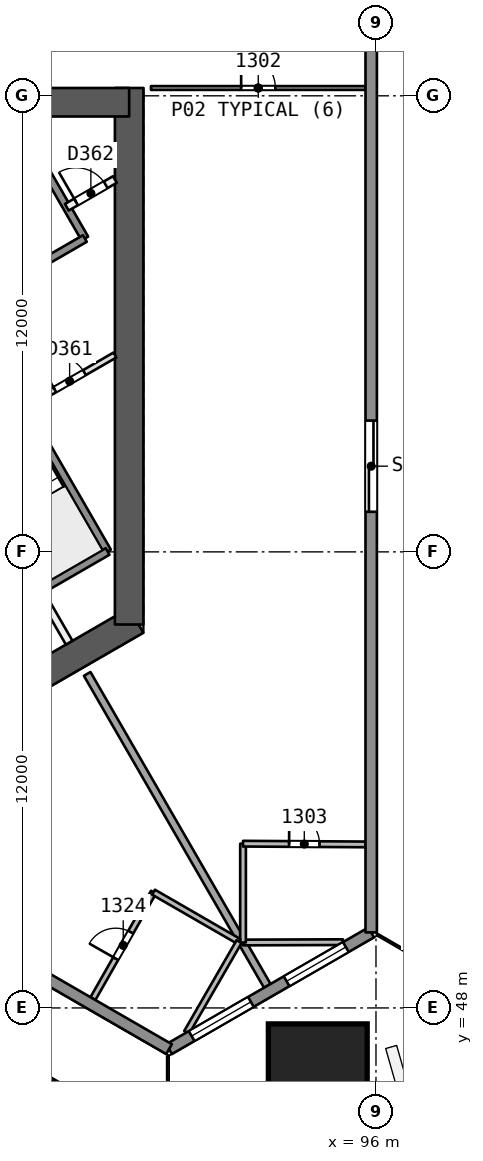
"""IFC4 building model, lengths in metres.
Left out: names, types, materials, properties, quantities, classifications, styles, units other than length and angle.
Written with IfcOpenShell. Run it as: python <this file> out.ifc"""

import sys

from ifc_helpers import new_model, si_unit, direction, frame, frame_2d, origin, origin_2d, place, context, subcontext, project, spatial, rectangle, extrude, element, fill, save


model = new_model("IFC4")
c1 = context("Model", 3, precision=1e-05, world=origin(), true_north=direction((0.0, 1.0)))
c2 = subcontext(c1, "Body", "Model", "MODEL_VIEW")
j1 = project(units=[si_unit("LENGTHUNIT", "METRE"), si_unit("PLANEANGLEUNIT", "RADIAN")], contexts=[c1])
p1 = place(None, origin())
s1 = spatial("IfcSite", under=j1, at=p1, CompositionType="ELEMENT")
p2 = place(p1, origin())
s2 = spatial("IfcBuilding", under=s1, at=p2, CompositionType="ELEMENT")
p3 = place(p2, frame((0.0, 0.0, 61.0)))
s3 = spatial("IfcBuildingStorey", under=s2, at=p3, CompositionType="ELEMENT", Elevation=61.0)
p4 = place(p3, frame((86.723, 56.483, 0.0), z_axis=(0.0, 0.0, 1.0), x_axis=(0.866017201164, 0.500014207086, 0.0)))
e1 = element("IfcWall", 1, at=p4, inside=s3, PredefinedType="SHEAR", context=c2, shape_type="SweptSolid", body=[
    extrude(rectangle(XDim=3.429, YDim=0.75, at=frame_2d((1.714, 0.0))), origin(), (0.0, 0.0, 1.0), 3.7),
])
p5 = place(p3, frame((89.505, 58.089, 0.0), z_axis=(0.0, 0.0, 1.0), x_axis=(0.0, 1.0, 0.0)))
e2 = element("IfcWall", 2, at=p5, inside=s3, PredefinedType="SHEAR", context=c2, shape_type="SweptSolid", body=[
    extrude(rectangle(XDim=14.117, YDim=0.75, at=frame_2d((7.059, 0.0))), origin(), (0.0, 0.0, 1.0), 3.7),
])
p6 = place(p3, frame((89.505, 71.831, 0.0), z_axis=(0.0, 0.0, 1.0), x_axis=(-1.0, 0.0, 0.0)))
e3 = element("IfcWall", 3, at=p6, inside=s3, PredefinedType="SHEAR", context=c2, shape_type="SweptSolid", body=[
    extrude(rectangle(XDim=10.005, YDim=0.75, at=frame_2d((5.002, 0.0))), origin(), (0.0, 0.0, 1.0), 3.7),
])
p7 = place(p6, frame((7.855, 0.0, 0.0)))
e4 = element("IfcOpeningElement", 4, at=p7, cuts=e3, PredefinedType="OPENING", context=c2, shape_type="SweptSolid", body=[
    extrude(rectangle(XDim=1.2, YDim=2.1, at=frame_2d((0.6, 1.05))), frame((0.0, 0.385, 0.0), z_axis=(0.0, -1.0, 0.0), x_axis=(1.0, 0.0, 0.0)), (0.0, 0.0, 1.0), 0.771),
])
p8 = place(p3, frame((94.49, 46.243, 0.0), z_axis=(-0.017607037296, 0.030466109479, 0.999380712447), x_axis=(0.500061328599, -0.865274797998, 0.035187946645)))
e5 = element("IfcColumn", 5, at=p8, inside=s3, PredefinedType="COLUMN", context=c2, shape_type="SweptSolid", body=[
    extrude(rectangle(XDim=2.6, YDim=2.6, at=origin_2d()), origin(), (0.0, 0.0, 1.0), 3.702),
])
p9 = place(p3, frame((90.079, 72.206, 0.0), z_axis=(0.0, 0.0, 1.0), x_axis=(1.0, 0.0, 0.0)))
e6 = element("IfcWall", 6, at=p9, inside=s3, PredefinedType="PARTITIONING", context=c2, shape_type="SweptSolid", body=[
    extrude(rectangle(XDim=5.646, YDim=0.1, at=frame_2d((2.823, 0.0))), origin(), (0.0, 0.0, 1.0), 3.2),
])
p10 = place(p9, frame((2.373, 0.0, 0.0)))
e7 = element("IfcOpeningElement", 7, at=p10, cuts=e6, PredefinedType="OPENING", context=c2, shape_type="SweptSolid", body=[
    extrude(rectangle(XDim=0.9, YDim=2.1, at=frame_2d((0.45, 1.05))), frame((0.0, 0.061, 0.0), z_axis=(0.0, -1.0, 0.0), x_axis=(1.0, 0.0, 0.0)), (0.0, 0.0, 1.0), 0.121),
])
p11 = place(p3, frame((95.131, 49.73, 0.0), z_axis=(0.0, 0.0, 1.0), x_axis=(-0.999994721507, -0.00324914735, 0.0)))
e8 = element("IfcWall", 8, at=p11, inside=s3, PredefinedType="PARTITIONING", context=c2, shape_type="SweptSolid", body=[
    extrude(rectangle(XDim=2.63, YDim=0.15, at=frame_2d((1.315, 0.0))), origin(), (0.0, 0.0, 1.0), 3.2),
])
p12 = place(p3, frame((92.501, 49.722, 0.0), z_axis=(0.0, 0.0, 1.0), x_axis=(0.0, 1.0, 0.0)))
e9 = element("IfcWall", 9, at=p12, inside=s3, PredefinedType="PARTITIONING", context=c2, shape_type="SweptSolid", body=[
    extrude(rectangle(XDim=2.6, YDim=0.15, at=frame_2d((1.3, 0.0))), origin(), (0.0, 0.0, 1.0), 3.2),
])
p13 = place(p3, frame((92.501, 52.322, 0.0), z_axis=(0.0, 0.0, 1.0), x_axis=(0.999982552355, -0.005907197749, 0.0)))
e10 = element("IfcWall", 10, at=p13, inside=s3, PredefinedType="PARTITIONING", context=c2, shape_type="SweptSolid", body=[
    extrude(rectangle(XDim=3.224, YDim=0.15, at=frame_2d((1.612, 0.0))), origin(), (0.0, 0.0, 1.0), 3.2),
])
p14 = place(p13, frame((1.212, 0.0, 0.0)))
e11 = element("IfcOpeningElement", 11, at=p14, cuts=e10, PredefinedType="OPENING", context=c2, shape_type="SweptSolid", body=[
    extrude(rectangle(XDim=0.8, YDim=2.1, at=frame_2d((0.4, 1.05))), frame((0.0, 0.085, 0.0), z_axis=(0.0, -1.0, 0.0), x_axis=(1.0, 0.0, 0.0)), (0.0, 0.0, 1.0), 0.171),
])
p15 = place(p3, frame((88.401, 56.789, 0.0), z_axis=(0.0, 0.0, 1.0), x_axis=(0.499990030109, -0.866031159827, 0.0)))
e12 = element("IfcWall", 12, at=p15, inside=s3, PredefinedType="PARTITIONING", context=c2, shape_type="SweptSolid", body=[
    extrude(rectangle(XDim=9.478, YDim=0.2, at=frame_2d((4.739, 0.0))), origin(), (0.0, 0.0, 1.0), 3.2),
])
p16 = place(p3, frame((88.551, 48.245, 0.0), z_axis=(0.0, 0.0, 1.0), x_axis=(0.494849738902, 0.868978558947, 0.0)))
e13 = element("IfcWall", 13, at=p16, inside=s3, PredefinedType="PARTITIONING", context=c2, shape_type="SweptSolid", body=[
    extrude(rectangle(XDim=3.224, YDim=0.15, at=frame_2d((1.612, 0.0))), origin(), (0.0, 0.0, 1.0), 3.2),
])
p17 = place(p16, frame((1.212, 0.0, 0.0)))
e14 = element("IfcOpeningElement", 14, at=p17, cuts=e13, PredefinedType="OPENING", context=c2, shape_type="SweptSolid", body=[
    extrude(rectangle(XDim=0.8, YDim=2.1, at=frame_2d((0.4, 1.05))), frame((0.0, 0.085, 0.0), z_axis=(0.0, -1.0, 0.0), x_axis=(1.0, 0.0, 0.0)), (0.0, 0.0, 1.0), 0.171),
])
p18 = place(p3, frame((90.146, 51.046, 0.0), z_axis=(0.0, 0.0, 1.0), x_axis=(0.866021400173, -0.500006934395, 0.0)))
e15 = element("IfcWall", 15, at=p18, inside=s3, PredefinedType="PARTITIONING", context=c2, shape_type="SweptSolid", body=[
    extrude(rectangle(XDim=2.6, YDim=0.15, at=frame_2d((1.3, 0.0))), origin(), (0.0, 0.0, 1.0), 3.2),
])
p19 = place(p3, frame((92.398, 49.746, 0.0), z_axis=(0.0, 0.0, 1.0), x_axis=(-0.50001084716, -0.866019141083, 0.0)))
e16 = element("IfcWall", 16, at=p19, inside=s3, PredefinedType="PARTITIONING", context=c2, shape_type="SweptSolid", body=[
    extrude(rectangle(XDim=2.76, YDim=0.15, at=frame_2d((1.38, 0.0))), origin(), (0.0, 0.0, 1.0), 3.2),
])
p20 = place(p3, frame((95.874, 49.987, 0.0), z_axis=(0.0, 0.0, 1.0), x_axis=(-0.866013487713, -0.500020638674, 0.0)))
e17 = element("IfcWall", 17, at=p20, inside=s3, PredefinedType="SOLIDWALL", context=c2, shape_type="SweptSolid", body=[
    extrude(rectangle(XDim=6.142, YDim=0.3, at=frame_2d((3.071, 0.0))), origin(), (0.0, 0.0, 1.0), 3.2),
])
p21 = place(p20, frame((0.771, 0.0, 0.9)))
e18 = element("IfcOpeningElement", 18, at=p21, cuts=e17, PredefinedType="OPENING", context=c2, shape_type="SweptSolid", body=[
    extrude(rectangle(XDim=1.8, YDim=1.5, at=frame_2d((0.9, 0.75))), frame((0.0, 0.161, 0.0), z_axis=(0.0, -1.0, 0.0), x_axis=(1.0, 0.0, 0.0)), (0.0, 0.0, 1.0), 0.321),
])
p22 = place(p20, frame((3.656, 0.0, 0.9)))
e19 = element("IfcOpeningElement", 19, at=p22, cuts=e17, PredefinedType="OPENING", context=c2, shape_type="SweptSolid", body=[
    extrude(rectangle(XDim=1.8, YDim=1.5, at=frame_2d((0.9, 0.75))), frame((0.0, 0.161, 0.0), z_axis=(0.0, -1.0, 0.0), x_axis=(1.0, 0.0, 0.0)), (0.0, 0.0, 1.0), 0.321),
])
p23 = place(p3, frame((95.874, 110.013, 0.0), z_axis=(0.0, 0.0, 1.0), x_axis=(0.0, -1.0, 0.0)))
e20 = element("IfcWall", 20, at=p23, inside=s3, PredefinedType="SOLIDWALL", context=c2, shape_type="SweptSolid", body=[
    extrude(rectangle(XDim=60.025, YDim=0.3, at=frame_2d((30.013, 0.0))), origin(), (0.0, 0.0, 1.0), 3.2),
])
p24 = place(p23, frame((28.501, 0.0, 0.0)))
e21 = element("IfcOpeningElement", 21, at=p24, cuts=e20, PredefinedType="OPENING", context=c2, shape_type="SweptSolid", body=[
    extrude(rectangle(XDim=2.4, YDim=2.4, at=frame_2d((1.2, 1.2))), frame((0.0, 0.161, 0.0), z_axis=(0.0, -1.0, 0.0), x_axis=(1.0, 0.0, 0.0)), (0.0, 0.0, 1.0), 0.321),
])
p25 = place(p23, frame((34.269, 0.0, 0.0)))
e22 = element("IfcOpeningElement", 22, at=p25, cuts=e20, PredefinedType="OPENING", context=c2, shape_type="SweptSolid", body=[
    extrude(rectangle(XDim=2.4, YDim=2.4, at=frame_2d((1.2, 1.2))), frame((0.0, 0.161, 0.0), z_axis=(0.0, -1.0, 0.0), x_axis=(1.0, 0.0, 0.0)), (0.0, 0.0, 1.0), 0.321),
])
p26 = place(p23, frame((46.558, 0.0, 0.0)))
e23 = element("IfcOpeningElement", 23, at=p26, cuts=e20, PredefinedType="OPENING", context=c2, shape_type="SweptSolid", body=[
    extrude(rectangle(XDim=2.4, YDim=2.4, at=frame_2d((1.2, 1.2))), frame((0.0, 0.161, 0.0), z_axis=(0.0, -1.0, 0.0), x_axis=(1.0, 0.0, 0.0)), (0.0, 0.0, 1.0), 0.321),
])
p27 = place(p23, frame((23.045, 0.0, 0.0)))
e24 = element("IfcOpeningElement", 24, at=p27, cuts=e20, PredefinedType="OPENING", context=c2, shape_type="SweptSolid", body=[
    extrude(rectangle(XDim=2.4, YDim=2.4, at=frame_2d((1.2, 1.2))), frame((0.0, 0.161, 0.0), z_axis=(0.0, -1.0, 0.0), x_axis=(1.0, 0.0, 0.0)), (0.0, 0.0, 1.0), 0.321),
])
p28 = place(p23, frame((11.109, 0.0, 0.0)))
e25 = element("IfcOpeningElement", 25, at=p28, cuts=e20, PredefinedType="OPENING", context=c2, shape_type="SweptSolid", body=[
    extrude(rectangle(XDim=2.4, YDim=2.4, at=frame_2d((1.2, 1.2))), frame((0.0, 0.161, 0.0), z_axis=(0.0, -1.0, 0.0), x_axis=(1.0, 0.0, 0.0)), (0.0, 0.0, 1.0), 0.321),
])
p29 = place(p3, frame((90.555, 46.916, 0.0), z_axis=(0.0, 0.0, 1.0), x_axis=(-0.866024926003, 0.500000827541, 0.0)))
e26 = element("IfcWall", 26, at=p29, inside=s3, PredefinedType="SOLIDWALL", context=c2, shape_type="SweptSolid", body=[
    extrude(rectangle(XDim=60.025, YDim=0.3, at=frame_2d((30.013, 0.0))), origin(), (0.0, 0.0, 1.0), 3.2),
])
p30 = place(p29, frame((28.813, 0.0, 0.0)))
e27 = element("IfcOpeningElement", 27, at=p30, cuts=e26, PredefinedType="OPENING", context=c2, shape_type="SweptSolid", body=[
    extrude(rectangle(XDim=2.4, YDim=2.4, at=frame_2d((1.2, 1.2))), frame((0.0, 0.161, 0.0), z_axis=(0.0, -1.0, 0.0), x_axis=(1.0, 0.0, 0.0)), (0.0, 0.0, 1.0), 0.321),
])
p31 = place(p29, frame((34.269, 0.0, 0.0)))
e28 = element("IfcOpeningElement", 28, at=p31, cuts=e26, PredefinedType="OPENING", context=c2, shape_type="SweptSolid", body=[
    extrude(rectangle(XDim=2.4, YDim=2.4, at=frame_2d((1.2, 1.2))), frame((0.0, 0.161, 0.0), z_axis=(0.0, -1.0, 0.0), x_axis=(1.0, 0.0, 0.0)), (0.0, 0.0, 1.0), 0.321),
])
p32 = place(p29, frame((46.558, 0.0, 0.0)))
e29 = element("IfcOpeningElement", 29, at=p32, cuts=e26, PredefinedType="OPENING", context=c2, shape_type="SweptSolid", body=[
    extrude(rectangle(XDim=2.4, YDim=2.4, at=frame_2d((1.2, 1.2))), frame((0.0, 0.161, 0.0), z_axis=(0.0, -1.0, 0.0), x_axis=(1.0, 0.0, 0.0)), (0.0, 0.0, 1.0), 0.321),
])
p33 = place(p29, frame((23.357, 0.0, 0.0)))
e30 = element("IfcOpeningElement", 30, at=p33, cuts=e26, PredefinedType="OPENING", context=c2, shape_type="SweptSolid", body=[
    extrude(rectangle(XDim=2.4, YDim=2.4, at=frame_2d((1.2, 1.2))), frame((0.0, 0.161, 0.0), z_axis=(0.0, -1.0, 0.0), x_axis=(1.0, 0.0, 0.0)), (0.0, 0.0, 1.0), 0.321),
])
p34 = place(p29, frame((11.109, 0.0, 0.0)))
e31 = element("IfcOpeningElement", 31, at=p34, cuts=e26, PredefinedType="OPENING", context=c2, shape_type="SweptSolid", body=[
    extrude(rectangle(XDim=2.4, YDim=2.4, at=frame_2d((1.2, 1.2))), frame((0.0, 0.161, 0.0), z_axis=(0.0, -1.0, 0.0), x_axis=(1.0, 0.0, 0.0)), (0.0, 0.0, 1.0), 0.321),
])
p35 = place(p3, frame((87.09, 59.06, 0.0), z_axis=(0.0, 0.0, 1.0), x_axis=(0.499937194881, -0.866061661301, 0.0)))
e32 = element("IfcWall", 32, at=p35, inside=s3, PredefinedType="PARTITIONING", context=c2, shape_type="SweptSolid", body=[
    extrude(rectangle(XDim=1.673, YDim=0.2, at=frame_2d((0.836, 0.0))), origin(), (0.0, 0.0, 1.0), 3.2),
])
p36 = place(p3, frame((85.087, 66.679, 0.0), z_axis=(0.0, 0.0, 1.0), x_axis=(0.500019787375, -0.866013979237, 0.0)))
e33 = element("IfcWall", 33, at=p36, inside=s3, PredefinedType="SOLIDWALL", context=c2, shape_type="SweptSolid", body=[
    extrude(rectangle(XDim=7.7, YDim=0.2, at=frame_2d((3.85, 0.0))), origin(), (0.0, 0.0, 1.0), 3.2),
])
p37 = place(p36, frame((0.55, 0.0, 0.0)))
e34 = element("IfcOpeningElement", 34, at=p37, cuts=e33, PredefinedType="OPENING", context=c2, shape_type="SweptSolid", body=[
    extrude(rectangle(XDim=1.1, YDim=2.1, at=frame_2d((0.55, 1.05))), frame((0.0, 0.11, 0.0), z_axis=(0.0, -1.0, 0.0), x_axis=(1.0, 0.0, 0.0)), (0.0, 0.0, 1.0), 0.221),
])
p38 = place(p3, frame((86.965, 70.626, 0.0), z_axis=(0.0, 0.0, 1.0), x_axis=(0.499996545922, -0.866027397988, 0.0)))
e35 = element("IfcWall", 35, at=p38, inside=s3, PredefinedType="SOLIDWALL", context=c2, shape_type="SweptSolid", body=[
    extrude(rectangle(XDim=2.75, YDim=0.2, at=frame_2d((1.375, 0.0))), origin(), (0.0, 0.0, 1.0), 3.2),
])
p39 = place(p3, frame((87.865, 69.068, 0.0), z_axis=(0.0, 0.0, 1.0), x_axis=(0.865982457891, 0.500074377092, 0.0)))
e36 = element("IfcWall", 36, at=p39, inside=s3, PredefinedType="PARTITIONING", context=c2, shape_type="SweptSolid", body=[
    extrude(rectangle(XDim=1.461, YDim=0.2, at=frame_2d((0.73, 0.0))), origin(), (0.0, 0.0, 1.0), 3.2),
])
p40 = place(p39, frame((0.281, 0.0, 0.0)))
e37 = element("IfcOpeningElement", 37, at=p40, cuts=e36, PredefinedType="OPENING", context=c2, shape_type="SweptSolid", body=[
    extrude(rectangle(XDim=0.9, YDim=2.1, at=frame_2d((0.45, 1.05))), frame((0.0, 0.11, 0.0), z_axis=(0.0, -1.0, 0.0), x_axis=(1.0, 0.0, 0.0)), (0.0, 0.0, 1.0), 0.221),
])
p41 = place(p3, frame((86.348, 67.095, 0.0), z_axis=(0.0, 0.0, 1.0), x_axis=(0.86602648383, 0.499998129301, 0.0)))
e38 = element("IfcWall", 38, at=p41, inside=s3, PredefinedType="SOLIDWALL", context=c2, shape_type="SweptSolid", body=[
    extrude(rectangle(XDim=2.3, YDim=0.2, at=frame_2d((1.15, 0.0))), origin(), (0.0, 0.0, 1.0), 3.2),
])
p42 = place(p3, frame((86.747, 63.804, 0.0), z_axis=(0.0, 0.0, 1.0), x_axis=(0.866023045711, 0.500004084281, 0.0)))
e39 = element("IfcWall", 39, at=p42, inside=s3, PredefinedType="PARTITIONING", context=c2, shape_type="SweptSolid", body=[
    extrude(rectangle(XDim=2.751, YDim=0.15, at=frame_2d((1.376, 0.0))), origin(), (0.0, 0.0, 1.0), 3.2),
])
p43 = place(p42, frame((0.926, 0.0, 0.0)))
e40 = element("IfcOpeningElement", 40, at=p43, cuts=e39, PredefinedType="OPENING", context=c2, shape_type="SweptSolid", body=[
    extrude(rectangle(XDim=0.9, YDim=2.1, at=frame_2d((0.45, 1.05))), frame((0.0, 0.085, 0.0), z_axis=(0.0, -1.0, 0.0), x_axis=(1.0, 0.0, 0.0)), (0.0, 0.0, 1.0), 0.171),
])
p44 = place(p3, frame((85.343, 57.935, 0.0), z_axis=(0.0, 0.0, 1.0), x_axis=(0.866004344652, 0.500036473714, 0.0)))
e41 = element("IfcWall", 41, at=p44, inside=s3, PredefinedType="SOLIDWALL", context=c2, shape_type="SweptSolid", body=[
    extrude(rectangle(XDim=4.15, YDim=0.2, at=frame_2d((2.075, 0.0))), origin(), (0.0, 0.0, 1.0), 3.2),
])
p45 = place(p10, origin())
e42 = element("IfcDoor", 42, at=p45, inside=s3, OperationType="SINGLE_SWING_LEFT", PredefinedType="NOTDEFINED", context=c2, shape_type="SweptSolid", body=[
    extrude(rectangle(XDim=0.9, YDim=2.1, at=frame_2d((0.45, 1.05))), frame((0.0, 0.025, 0.0), z_axis=(0.0, -1.0, 0.0), x_axis=(1.0, 0.0, 0.0)), (0.0, 0.0, 1.0), 0.05),
])
fill(e7, e42)
p46 = place(p14, origin())
e43 = element("IfcDoor", 43, at=p46, inside=s3, OperationType="SINGLE_SWING_LEFT", PredefinedType="NOTDEFINED", context=c2, shape_type="SweptSolid", body=[
    extrude(rectangle(XDim=0.8, YDim=2.1, at=frame_2d((0.4, 1.05))), frame((0.0, 0.025, 0.0), z_axis=(0.0, -1.0, 0.0), x_axis=(1.0, 0.0, 0.0)), (0.0, 0.0, 1.0), 0.05),
])
fill(e11, e43)
p47 = place(p17, origin())
e44 = element("IfcDoor", 44, at=p47, inside=s3, OperationType="SINGLE_SWING_LEFT", PredefinedType="NOTDEFINED", context=c2, shape_type="SweptSolid", body=[
    extrude(rectangle(XDim=0.8, YDim=2.1, at=frame_2d((0.4, 1.05))), frame((0.0, 0.025, 0.0), z_axis=(0.0, -1.0, 0.0), x_axis=(1.0, 0.0, 0.0)), (0.0, 0.0, 1.0), 0.05),
])
fill(e14, e44)
p48 = place(p21, origin())
e45 = element("IfcWindow", 45, at=p48, inside=s3, PartitioningType="SINGLE_PANEL", PredefinedType="WINDOW", context=c2, shape_type="SweptSolid", body=[
    extrude(rectangle(XDim=1.8, YDim=1.5, at=frame_2d((0.9, 0.75))), frame((0.0, 0.03, 0.0), z_axis=(0.0, -1.0, 0.0), x_axis=(1.0, 0.0, 0.0)), (0.0, 0.0, 1.0), 0.06),
])
fill(e18, e45)
p49 = place(p22, origin())
e46 = element("IfcWindow", 46, at=p49, inside=s3, PartitioningType="SINGLE_PANEL", PredefinedType="WINDOW", context=c2, shape_type="SweptSolid", body=[
    extrude(rectangle(XDim=1.8, YDim=1.5, at=frame_2d((0.9, 0.75))), frame((0.0, 0.03, 0.0), z_axis=(0.0, -1.0, 0.0), x_axis=(1.0, 0.0, 0.0)), (0.0, 0.0, 1.0), 0.06),
])
fill(e19, e46)
p50 = place(p26, origin())
e47 = element("IfcDoor", 47, at=p50, inside=s3, OperationType="SLIDING_TO_LEFT", PredefinedType="NOTDEFINED", context=c2, shape_type="SweptSolid", body=[
    extrude(rectangle(XDim=2.4, YDim=2.4, at=frame_2d((1.2, 1.2))), frame((0.0, 0.025, 0.0), z_axis=(0.0, -1.0, 0.0), x_axis=(1.0, 0.0, 0.0)), (0.0, 0.0, 1.0), 0.05),
])
fill(e23, e47)
p51 = place(p43, origin())
e48 = element("IfcDoor", 48, at=p51, inside=s3, OperationType="SINGLE_SWING_LEFT", PredefinedType="NOTDEFINED", context=c2, shape_type="SweptSolid", body=[
    extrude(rectangle(XDim=0.9, YDim=2.1, at=frame_2d((0.45, 1.05))), frame((0.0, 0.025, 0.0), z_axis=(0.0, -1.0, 0.0), x_axis=(1.0, 0.0, 0.0)), (0.0, 0.0, 1.0), 0.05),
])
fill(e40, e48)
p52 = place(p40, origin())
e49 = element("IfcDoor", 49, at=p52, inside=s3, OperationType="SINGLE_SWING_LEFT", PredefinedType="NOTDEFINED", context=c2, shape_type="SweptSolid", body=[
    extrude(rectangle(XDim=0.9, YDim=2.1, at=frame_2d((0.45, 1.05))), frame((0.0, 0.025, 0.0), z_axis=(0.0, -1.0, 0.0), x_axis=(1.0, 0.0, 0.0)), (0.0, 0.0, 1.0), 0.05),
])
fill(e37, e49)
save(model, sys.argv[1])
